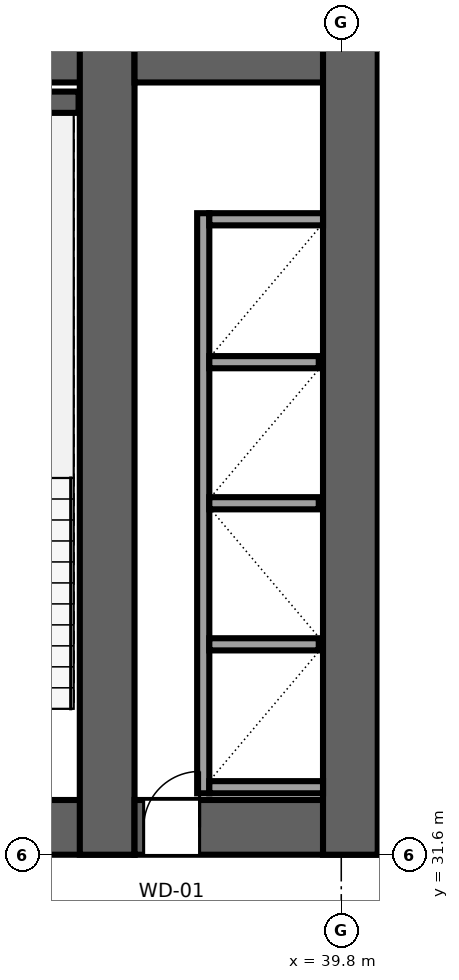
"""IFC4 building model, lengths in metres.
Left out: names, types, materials, properties, quantities, classifications, styles, units other than length and angle.
Written with IfcOpenShell. Run it as: python <this file> out.ifc"""

import sys

from ifc_helpers import new_model, si_unit, direction, frame, frame_2d, origin, place, context, subcontext, project, spatial, rectangle, extrude, source, transform, mapped, element, fill, save


model = new_model("IFC4")
c1 = context("Model", 3, precision=1e-05, world=origin(), true_north=direction((0.0, 1.0)))
c2 = subcontext(c1, "Body", "Model", "MODEL_VIEW")
j1 = project(units=[si_unit("LENGTHUNIT", "METRE"), si_unit("PLANEANGLEUNIT", "RADIAN")], contexts=[c1])
p1 = place(None, origin())
s1 = spatial("IfcSite", under=j1, at=p1, CompositionType="ELEMENT")
p2 = place(p1, origin())
s2 = spatial("IfcBuilding", under=s1, at=p2, CompositionType="ELEMENT")
p3 = place(p2, frame((0.0, 0.0, 22.4)))
s3 = spatial("IfcBuildingStorey", under=s2, at=p3, CompositionType="ELEMENT", Elevation=22.4)
p4 = place(p3, frame((9.6, 32.05, 0.0), z_axis=(0.0, 0.0, 1.0), x_axis=(1.0, 0.0, 0.0)))
e1 = element("IfcWall", 1, at=p4, inside=s3, PredefinedType="SHEAR", context=c2, shape_type="SweptSolid", body=[
    extrude(rectangle(XDim=26.8, YDim=0.9, at=frame_2d((13.4, 0.0))), origin(), (0.0, 0.0, 1.0), 4.4),
])
p5 = place(p4, frame((6.52, 0.0, 0.0), z_axis=(0.0, 0.0, 1.0), x_axis=(-1.0, 0.0, 0.0)))
e2 = element("IfcOpeningElement", 2, at=p5, cuts=e1, PredefinedType="OPENING", context=c2, shape_type="SweptSolid", body=[
    extrude(rectangle(XDim=1.5, YDim=2.04, at=frame_2d((0.75, 1.02))), frame((0.0, 0.46, 0.0), z_axis=(0.0, -1.0, 0.0), x_axis=(1.0, 0.0, 0.0)), (0.0, 0.0, 1.0), 0.92),
])
p6 = place(p4, frame((14.15, 0.0, 0.0), z_axis=(0.0, 0.0, 1.0), x_axis=(-1.0, 0.0, 0.0)))
e3 = element("IfcOpeningElement", 3, at=p6, cuts=e1, PredefinedType="OPENING", context=c2, shape_type="SweptSolid", body=[
    extrude(rectangle(XDim=1.5, YDim=2.04, at=frame_2d((0.75, 1.02))), frame((0.0, 0.46, 0.0), z_axis=(0.0, -1.0, 0.0), x_axis=(1.0, 0.0, 0.0)), (0.0, 0.0, 1.0), 0.92),
])
p7 = place(p4, frame((20.45, 0.0, 0.0), z_axis=(0.0, 0.0, 1.0), x_axis=(-1.0, 0.0, 0.0)))
e4 = element("IfcOpeningElement", 4, at=p7, cuts=e1, PredefinedType="OPENING", context=c2, shape_type="SweptSolid", body=[
    extrude(rectangle(XDim=1.5, YDim=2.04, at=frame_2d((0.75, 1.02))), frame((0.0, 0.46, 0.0), z_axis=(0.0, -1.0, 0.0), x_axis=(1.0, 0.0, 0.0)), (0.0, 0.0, 1.0), 0.92),
])
p8 = place(p4, frame((8.57, 0.0, 0.0), z_axis=(0.0, 0.0, 1.0), x_axis=(-1.0, 0.0, 0.0)))
e5 = element("IfcOpeningElement", 5, at=p8, cuts=e1, PredefinedType="OPENING", context=c2, shape_type="SweptSolid", body=[
    extrude(rectangle(XDim=0.82, YDim=2.01, at=frame_2d((0.41, 1.005))), frame((0.0, 0.46, 0.0), z_axis=(0.0, -1.0, 0.0), x_axis=(1.0, 0.0, 0.0)), (0.0, 0.0, 1.0), 0.92),
])
p9 = place(p3, frame((9.6, 44.75, 0.0), z_axis=(0.0, 0.0, 1.0), x_axis=(1.0, 0.0, 0.0)))
e6 = element("IfcWall", 6, at=p9, inside=s3, PredefinedType="SHEAR", context=c2, shape_type="SweptSolid", body=[
    extrude(rectangle(XDim=26.8, YDim=0.9, at=frame_2d((13.4, 0.0))), origin(), (0.0, 0.0, 1.0), 4.4),
])
p10 = place(p3, frame((35.95, 31.6, 0.0), z_axis=(0.0, 0.0, 1.0), x_axis=(0.0, 1.0, 0.0)))
e7 = element("IfcWall", 7, at=p10, inside=s3, PredefinedType="SHEAR", context=c2, shape_type="SweptSolid", body=[
    extrude(rectangle(XDim=13.6, YDim=0.9, at=frame_2d((6.8, 0.0))), origin(), (0.0, 0.0, 1.0), 4.4),
])
p11 = place(p3, frame((36.4, 32.05, 0.0), z_axis=(0.0, 0.0, 1.0), x_axis=(1.0, 0.0, 0.0)))
e8 = element("IfcWall", 8, at=p11, inside=s3, PredefinedType="SHEAR", context=c2, shape_type="SweptSolid", body=[
    extrude(rectangle(XDim=4.0, YDim=0.9, at=frame_2d((2.0, 0.0))), origin(), (0.0, 0.0, 1.0), 4.4),
])
p12 = place(p11, frame((1.07, 0.0, 0.0), z_axis=(0.0, 0.0, 1.0), x_axis=(-1.0, 0.0, 0.0)))
e9 = element("IfcOpeningElement", 9, at=p12, cuts=e8, PredefinedType="OPENING", context=c2, shape_type="SweptSolid", body=[
    extrude(rectangle(XDim=0.92, YDim=2.01, at=frame_2d((0.46, 1.005))), frame((0.0, 0.46, 0.0), z_axis=(0.0, -1.0, 0.0), x_axis=(1.0, 0.0, 0.0)), (0.0, 0.0, 1.0), 0.92),
])
p13 = place(p3, frame((36.4, 44.75, 0.0), z_axis=(0.0, 0.0, 1.0), x_axis=(1.0, 0.0, 0.0)))
e10 = element("IfcWall", 10, at=p13, inside=s3, PredefinedType="SHEAR", context=c2, shape_type="SweptSolid", body=[
    extrude(rectangle(XDim=4.0, YDim=0.9, at=frame_2d((2.0, 0.0))), origin(), (0.0, 0.0, 1.0), 4.4),
])
p14 = place(p3, frame((39.95, 31.6, 0.0), z_axis=(0.0, 0.0, 1.0), x_axis=(0.0, 1.0, 0.0)))
e11 = element("IfcWall", 11, at=p14, inside=s3, PredefinedType="SHEAR", context=c2, shape_type="SweptSolid", body=[
    extrude(rectangle(XDim=13.6, YDim=0.9, at=frame_2d((6.8, 0.0))), origin(), (0.0, 0.0, 1.0), 4.4),
])
p15 = place(p3, frame((31.88, 43.975, 0.0), z_axis=(0.0, 0.0, 1.0), x_axis=(1.0, 0.0, 0.0)))
e12 = element("IfcWall", 12, at=p15, inside=s3, PredefinedType="SHEAR", context=c2, shape_type="SweptSolid", body=[
    extrude(rectangle(XDim=3.6, YDim=0.35, at=frame_2d((1.8, 0.0))), origin(), (0.0, 0.0, 1.0), 4.4),
])
p16 = place(p3, frame((37.53, 32.61, 0.0), z_axis=(0.0, 0.0, 1.0), x_axis=(0.0, 1.0, 0.0)))
e13 = element("IfcWall", 13, at=p16, inside=s3, PredefinedType="SOLIDWALL", context=c2, shape_type="SweptSolid", body=[
    extrude(rectangle(XDim=9.54, YDim=0.2, at=frame_2d((4.77, 0.0))), origin(), (0.0, 0.0, 1.0), 4.14),
])
for number, where, z_axis, x_axis in (
    (14, (37.63, 32.71, 0.0), (0.0, 0.0, 1.0), (1.0, 0.0, 0.0)),
    (15, (37.63, 42.05, 0.0), (0.0, 0.0, 1.0), (1.0, 0.0, 0.0)),
):
    element("IfcWall", number, at=place(p3, frame(where, z_axis=z_axis, x_axis=x_axis)), inside=s3, PredefinedType="SOLIDWALL", context=c2, shape_type="SweptSolid", body=[
        extrude(rectangle(XDim=1.87, YDim=0.2, at=frame_2d((0.935, 0.0))), origin(), (0.0, 0.0, 1.0), 4.14),
    ])
for number, where, z_axis, x_axis in (
    (16, (37.63, 35.06, 0.0), (0.0, 0.0, 1.0), (1.0, 0.0, 0.0)),
    (17, (37.63, 37.38, 0.0), (0.0, 0.0, 1.0), (1.0, 0.0, 0.0)),
    (18, (37.63, 39.7, 0.0), (0.0, 0.0, 1.0), (1.0, 0.0, 0.0)),
):
    element("IfcWall", number, at=place(p3, frame(where, z_axis=z_axis, x_axis=x_axis)), inside=s3, PredefinedType="SOLIDWALL", context=c2, shape_type="SweptSolid", body=[
        extrude(rectangle(XDim=1.8, YDim=0.2, at=frame_2d((0.9, 0.0))), origin(), (0.0, 0.0, 1.0), 4.14),
    ])
m1 = source(origin(), c2, "Body", "SweptSolid", [
    extrude(rectangle(XDim=0.92, YDim=2.01, at=frame_2d((0.46, 1.005))), frame((0.0, 0.025, 0.0), z_axis=(0.0, -1.0, 0.0), x_axis=(1.0, 0.0, 0.0)), (0.0, 0.0, 1.0), 0.05),
])
p17 = place(p12, origin())
e19 = element("IfcDoor", 19, at=p17, inside=s3, OperationType="SINGLE_SWING_RIGHT", PredefinedType="DOOR", context=c2, shape_type="MappedRepresentation", body=[
    mapped(m1, transform((0.0, 0.0, 0.0), x_axis=(1.0, 0.0, 0.0), y_axis=(0.0, 1.0, 0.0), z_axis=(0.0, 0.0, 1.0), scale=1.0)),
])
fill(e9, e19)
save(model, sys.argv[1])
